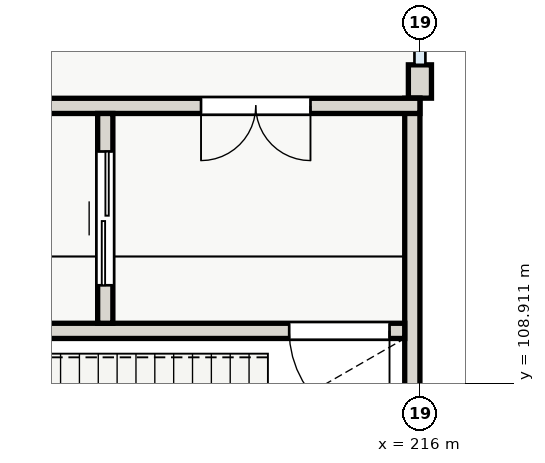
"""IFC4 building model, lengths in metres.
Left out: names, types, materials, properties, quantities, classifications, styles, units other than length and angle.
Written with IfcOpenShell. Run it as: python <this file> out.ifc"""

import sys

from ifc_helpers import new_model, si_unit, direction, frame, frame_2d, origin, place, context, subcontext, project, spatial, rectangle, extrude, element, fill, save


model = new_model("IFC4")
c1 = context("Model", 3, precision=1e-05, world=origin(), true_north=direction((0.0, 1.0)))
c2 = subcontext(c1, "Body", "Model", "MODEL_VIEW")
j1 = project(units=[si_unit("LENGTHUNIT", "METRE"), si_unit("PLANEANGLEUNIT", "RADIAN")], contexts=[c1])
p1 = place(None, origin())
s1 = spatial("IfcSite", under=j1, at=p1, CompositionType="ELEMENT")
p2 = place(p1, origin())
s2 = spatial("IfcBuilding", under=s1, at=p2, CompositionType="ELEMENT")
p3 = place(p2, frame((0.0, 0.0, 4.2)))
s3 = spatial("IfcBuildingStorey", under=s2, at=p3, CompositionType="ELEMENT", Elevation=4.2)
p4 = place(p3, frame((216.0, 114.15, 0.0), z_axis=(0.0, 0.0, 1.0), x_axis=(0.0, -1.0, 0.0)))
e1 = element("IfcWall", 1, at=p4, inside=s3, PredefinedType="SOLIDWALL", context=c2, shape_type="SweptSolid", body=[
    extrude(rectangle(XDim=0.548, YDim=0.38, at=frame_2d((0.274, 0.0))), origin(), (0.0, 0.0, 1.0), 2.92),
])
p5 = place(p3, frame((215.875, 113.6, 0.0), z_axis=(0.0, 0.0, 1.0), x_axis=(0.0, -1.0, 0.0)))
e2 = element("IfcWall", 2, at=p5, inside=s3, PredefinedType="SHEAR", context=c2, shape_type="SweptSolid", body=[
    extrude(rectangle(XDim=9.2, YDim=0.25, at=frame_2d((4.6, 0.0))), origin(), (0.0, 0.0, 1.0), 4.2),
])
p6 = place(p3, frame((216.0, 113.475, 0.0), z_axis=(0.0, 0.0, 1.0), x_axis=(-1.0, 0.0, 0.0)))
e3 = element("IfcWall", 3, at=p6, inside=s3, PredefinedType="SHEAR", context=c2, shape_type="SweptSolid", body=[
    extrude(rectangle(XDim=9.2, YDim=0.25, at=frame_2d((4.6, 0.0))), origin(), (0.0, 0.0, 1.0), 4.2),
])
p7 = place(p6, frame((1.8, 0.0, 0.0)))
e4 = element("IfcOpeningElement", 4, at=p7, cuts=e3, PredefinedType="OPENING", context=c2, shape_type="SweptSolid", body=[
    extrude(rectangle(XDim=1.8, YDim=2.15, at=frame_2d((0.9, 1.075))), frame((0.0, 0.135, 0.0), z_axis=(0.0, -1.0, 0.0), x_axis=(1.0, 0.0, 0.0)), (0.0, 0.0, 1.0), 0.27),
])
p8 = place(p3, frame((215.75, 109.775, 0.0), z_axis=(0.0, 0.0, 1.0), x_axis=(-1.0, 0.0, 0.0)))
e5 = element("IfcWall", 5, at=p8, inside=s3, PredefinedType="SHEAR", context=c2, shape_type="SweptSolid", body=[
    extrude(rectangle(XDim=8.7, YDim=0.25, at=frame_2d((4.35, 0.0))), origin(), (0.0, 0.0, 1.0), 4.2),
])
p9 = place(p8, frame((0.25, 0.0, 0.0)))
e6 = element("IfcOpeningElement", 6, at=p9, cuts=e5, PredefinedType="OPENING", context=c2, shape_type="SweptSolid", body=[
    extrude(rectangle(XDim=1.65, YDim=2.1, at=frame_2d((0.825, 1.05))), frame((0.0, 0.135, 0.0), z_axis=(0.0, -1.0, 0.0), x_axis=(1.0, 0.0, 0.0)), (0.0, 0.0, 1.0), 0.27),
])
p10 = place(p3, frame((210.825, 109.9, 0.0), z_axis=(0.0, 0.0, 1.0), x_axis=(0.0, 1.0, 0.0)))
e7 = element("IfcWall", 7, at=p10, inside=s3, PredefinedType="SHEAR", context=c2, shape_type="SweptSolid", body=[
    extrude(rectangle(XDim=3.45, YDim=0.25, at=frame_2d((1.725, 0.0))), origin(), (0.0, 0.0, 1.0), 4.2),
])
p11 = place(p10, frame((0.625, 0.0, 0.0)))
e8 = element("IfcOpeningElement", 8, at=p11, cuts=e7, PredefinedType="OPENING", context=c2, shape_type="SweptSolid", body=[
    extrude(rectangle(XDim=2.2, YDim=2.35, at=frame_2d((1.1, 1.175))), frame((0.0, 0.135, 0.0), z_axis=(0.0, -1.0, 0.0), x_axis=(1.0, 0.0, 0.0)), (0.0, 0.0, 1.0), 0.27),
])
p12 = place(p7, origin())
e9 = element("IfcDoor", 9, at=p12, inside=s3, OperationType="DOUBLE_DOOR_SINGLE_SWING", PredefinedType="DOOR", context=c2, shape_type="SweptSolid", body=[
    extrude(rectangle(XDim=1.8, YDim=2.15, at=frame_2d((0.9, 1.075))), frame((0.0, 0.025, 0.0), z_axis=(0.0, -1.0, 0.0), x_axis=(1.0, 0.0, 0.0)), (0.0, 0.0, 1.0), 0.05),
])
fill(e4, e9)
p13 = place(p9, origin())
e10 = element("IfcDoor", 10, at=p13, inside=s3, OperationType="SINGLE_SWING_LEFT", PredefinedType="DOOR", context=c2, shape_type="SweptSolid", body=[
    extrude(rectangle(XDim=1.65, YDim=2.1, at=frame_2d((0.825, 1.05))), frame((0.0, 0.025, 0.0), z_axis=(0.0, -1.0, 0.0), x_axis=(1.0, 0.0, 0.0)), (0.0, 0.0, 1.0), 0.05),
])
fill(e6, e10)
p14 = place(p11, origin())
e11 = element("IfcDoor", 11, at=p14, inside=s3, OperationType="SLIDING_TO_LEFT", PredefinedType="DOOR", context=c2, shape_type="SweptSolid", body=[
    extrude(rectangle(XDim=2.2, YDim=2.35, at=frame_2d((1.1, 1.175))), frame((0.0, 0.025, 0.0), z_axis=(0.0, -1.0, 0.0), x_axis=(1.0, 0.0, 0.0)), (0.0, 0.0, 1.0), 0.05),
])
fill(e8, e11)
save(model, sys.argv[1])
